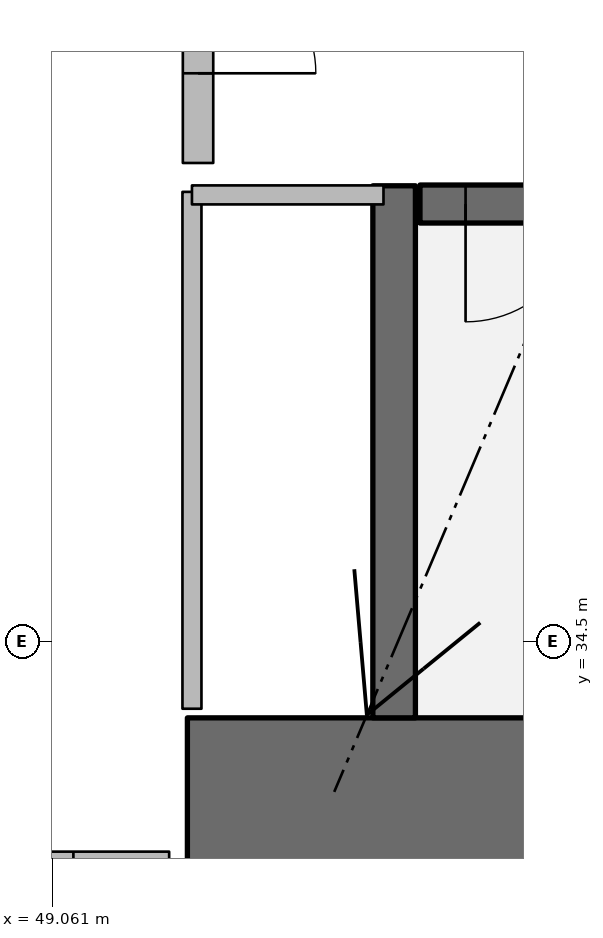
"""IFC4 building model, lengths in metres.
Left out: names, types, materials, properties, quantities, classifications, styles, units other than length and angle.
Written with IfcOpenShell. Run it as: python <this file> out.ifc"""

import sys

from ifc_helpers import new_model, si_unit, direction, frame, frame_2d, origin, place, context, subcontext, project, spatial, rectangle, extrude, element, fill, save


model = new_model("IFC4")
c1 = context("Model", 3, precision=1e-05, world=origin(), true_north=direction((0.0, 1.0)))
c2 = subcontext(c1, "Body", "Model", "MODEL_VIEW")
j1 = project(units=[si_unit("LENGTHUNIT", "METRE"), si_unit("PLANEANGLEUNIT", "RADIAN")], contexts=[c1])
p1 = place(None, origin())
s1 = spatial("IfcSite", under=j1, at=p1, CompositionType="ELEMENT")
p2 = place(p1, origin())
s2 = spatial("IfcBuilding", under=s1, at=p2, CompositionType="ELEMENT")
p3 = place(p2, origin())
s3 = spatial("IfcBuildingStorey", under=s2, at=p3, CompositionType="ELEMENT", Elevation=0.0)
p4 = place(p3, frame((49.95, 33.45, 0.0), z_axis=(0.0, 0.0, 1.0), x_axis=(1.0, 0.0, 0.0)))
e1 = element("IfcWall", 1, at=p4, inside=s3, PredefinedType="SHEAR", context=c2, shape_type="SweptSolid", body=[
    extrude(rectangle(XDim=10.2, YDim=1.1, at=frame_2d((5.1, 0.0))), origin(), (0.0, 0.0, 1.0), 7.2),
])
p5 = place(p3, frame((51.31, 34.0, 0.0), z_axis=(0.0, 0.0, 1.0), x_axis=(0.0, 1.0, 0.0)))
e2 = element("IfcWall", 2, at=p5, inside=s3, PredefinedType="SHEAR", context=c2, shape_type="SweptSolid", body=[
    extrude(rectangle(XDim=3.5, YDim=0.28, at=frame_2d((1.75, 0.0))), origin(), (0.0, 0.0, 1.0), 7.2),
])
p6 = place(p3, frame((51.48, 37.38, 0.0), z_axis=(0.0, 0.0, 1.0), x_axis=(1.0, 0.0, 0.0)))
e3 = element("IfcWall", 3, at=p6, inside=s3, PredefinedType="SOLIDWALL", context=c2, shape_type="SweptSolid", body=[
    extrude(rectangle(XDim=7.54, YDim=0.25, at=frame_2d((3.77, 0.0))), origin(), (0.0, 0.0, 1.0), 6.8),
])
p7 = place(p6, frame((0.3, 0.0, 0.0)))
e4 = element("IfcOpeningElement", 4, at=p7, cuts=e3, PredefinedType="OPENING", context=c2, shape_type="SweptSolid", body=[
    extrude(rectangle(XDim=1.55, YDim=2.15, at=frame_2d((0.775, 1.075))), frame((0.0, 0.135, 0.0), z_axis=(0.0, -1.0, 0.0), x_axis=(1.0, 0.0, 0.0)), (0.0, 0.0, 1.0), 0.27),
])
p8 = place(p3, frame((47.02, 33.02, 0.0), z_axis=(0.0, 0.0, 1.0), x_axis=(1.0, 0.0, 0.0)))
e5 = element("IfcWall", 5, at=p8, inside=s3, PredefinedType="PARTITIONING", context=c2, shape_type="SweptSolid", body=[
    extrude(rectangle(XDim=2.81, YDim=0.2, at=frame_2d((1.405, 0.0))), origin(), (0.0, 0.0, 1.0), 6.8),
])
p9 = place(p8, frame((0.63, 0.0, 0.0)))
e6 = element("IfcOpeningElement", 6, at=p9, cuts=e5, PredefinedType="OPENING", context=c2, shape_type="SweptSolid", body=[
    extrude(rectangle(XDim=1.55, YDim=2.15, at=frame_2d((0.775, 1.075))), frame((0.0, 0.11, 0.0), z_axis=(0.0, -1.0, 0.0), x_axis=(1.0, 0.0, 0.0)), (0.0, 0.0, 1.0), 0.22),
])
p10 = place(p3, frame((50.02, 37.65, 0.0), z_axis=(0.0, 0.0, 1.0), x_axis=(0.0, 1.0, 0.0)))
e7 = element("IfcWall", 7, at=p10, inside=s3, PredefinedType="PARTITIONING", context=c2, shape_type="SweptSolid", body=[
    extrude(rectangle(XDim=2.73, YDim=0.2, at=frame_2d((1.365, 0.0))), origin(), (0.0, 0.0, 1.0), 6.8),
])
p11 = place(p10, frame((0.59, 0.0, 0.0)))
e8 = element("IfcOpeningElement", 8, at=p11, cuts=e7, PredefinedType="OPENING", context=c2, shape_type="SweptSolid", body=[
    extrude(rectangle(XDim=1.55, YDim=2.15, at=frame_2d((0.775, 1.075))), frame((0.0, 0.11, 0.0), z_axis=(0.0, -1.0, 0.0), x_axis=(1.0, 0.0, 0.0)), (0.0, 0.0, 1.0), 0.22),
])
p12 = place(p3, frame((49.98, 34.06, 0.0), z_axis=(0.0, 0.0, 1.0), x_axis=(0.0, 1.0, 0.0)))
e9 = element("IfcWall", 9, at=p12, inside=s3, PredefinedType="PARTITIONING", context=c2, shape_type="SweptSolid", body=[
    extrude(rectangle(XDim=3.4, YDim=0.125, at=frame_2d((1.7, 0.0))), origin(), (0.0, 0.0, 1.0), 6.24),
])
p13 = place(p3, frame((49.98, 37.44, 0.0), z_axis=(0.0, 0.0, 1.0), x_axis=(1.0, 0.0, 0.0)))
e10 = element("IfcWall", 10, at=p13, inside=s3, PredefinedType="PARTITIONING", context=c2, shape_type="SweptSolid", body=[
    extrude(rectangle(XDim=1.26, YDim=0.125, at=frame_2d((0.63, 0.0))), origin(), (0.0, 0.0, 1.0), 6.24),
])
p14 = place(p7, origin())
e11 = element("IfcDoor", 11, at=p14, inside=s3, OperationType="DOUBLE_DOOR_SINGLE_SWING", PredefinedType="DOOR", context=c2, shape_type="SweptSolid", body=[
    extrude(rectangle(XDim=1.55, YDim=2.15, at=frame_2d((0.775, 1.075))), frame((0.0, 0.025, 0.0), z_axis=(0.0, -1.0, 0.0), x_axis=(1.0, 0.0, 0.0)), (0.0, 0.0, 1.0), 0.05),
])
fill(e4, e11)
p15 = place(p11, origin())
e12 = element("IfcDoor", 12, at=p15, inside=s3, OperationType="DOUBLE_DOOR_SINGLE_SWING", PredefinedType="DOOR", context=c2, shape_type="SweptSolid", body=[
    extrude(rectangle(XDim=1.55, YDim=2.15, at=frame_2d((0.775, 1.075))), frame((0.0, 0.025, 0.0), z_axis=(0.0, -1.0, 0.0), x_axis=(1.0, 0.0, 0.0)), (0.0, 0.0, 1.0), 0.05),
])
fill(e8, e12)
save(model, sys.argv[1])
